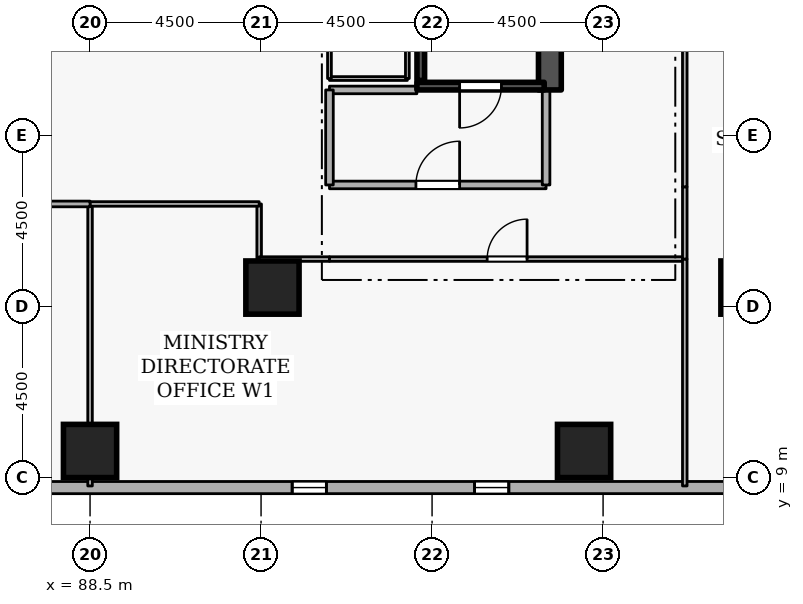
"""IFC4 building model, lengths in metres.
Left out: names, types, materials, properties, quantities, classifications, styles, units other than length and angle.
Written with IfcOpenShell. Run it as: python <this file> out.ifc"""

import sys

from ifc_helpers import new_model, si_unit, direction, frame, frame_2d, origin, origin_2d, place, context, subcontext, project, spatial, rectangle, extrude, element, fill, save


model = new_model("IFC4")
c1 = context("Model", 3, precision=1e-05, world=origin(), true_north=direction((0.0, 1.0)))
c2 = subcontext(c1, "Body", "Model", "MODEL_VIEW")
j1 = project(units=[si_unit("LENGTHUNIT", "METRE"), si_unit("PLANEANGLEUNIT", "RADIAN")], contexts=[c1])
p1 = place(None, origin())
s1 = spatial("IfcSite", under=j1, at=p1, CompositionType="ELEMENT")
p2 = place(p1, origin())
s2 = spatial("IfcBuilding", under=s1, at=p2, CompositionType="ELEMENT")
p3 = place(p2, frame((0.0, 0.0, 57.3)))
s3 = spatial("IfcBuildingStorey", under=s2, at=p3, CompositionType="ELEMENT", Elevation=57.3)
p4 = place(p3, frame((100.6, 19.2, 0.0), z_axis=(0.0, 0.0, 1.0), x_axis=(0.0, 1.0, 0.0)))
e1 = element("IfcWall", 1, at=p4, inside=s3, PredefinedType="SHEAR", context=c2, shape_type="SweptSolid", body=[
    extrude(rectangle(XDim=15.6, YDim=0.6, at=frame_2d((7.8, 0.0))), origin(), (0.0, 0.0, 1.0), 3.6),
])
for number, where, z_axis, x_axis in (
    (2, (105.8, 14.0, 0.0), (0.0, 0.0, 1.0), (1.0, 0.0, 0.0)),
    (3, (101.5, 9.7, 0.0), (0.0, 0.0, 1.0), (1.0, 0.0, 0.0)),
    (4, (88.5, 9.7, 0.0), (0.0, 0.0, 1.0), (1.0, 0.0, 0.0)),
    (5, (93.3, 14.0, 0.0), (0.0, 0.0, 1.0), (1.0, 0.0, 0.0)),
):
    element("IfcColumn", number, at=place(p3, frame(where, z_axis=z_axis, x_axis=x_axis)), inside=s3, PredefinedType="COLUMN", context=c2, shape_type="SweptSolid", body=[
        extrude(rectangle(XDim=1.4, YDim=1.4, at=origin_2d()), origin(), (0.0, 0.0, 1.0), 3.6),
    ])
p5 = place(p3, frame((72.819, 8.735, 0.0), z_axis=(0.0, 0.0, 1.0), x_axis=(0.999999996195, 8.7231344e-05, 0.0)))
e6 = element("IfcWall", 6, at=p5, inside=s3, PredefinedType="STANDARD", context=c2, shape_type="SweptSolid", body=[
    extrude(rectangle(XDim=36.384, YDim=0.32, at=frame_2d((18.192, 0.0))), origin(), (0.0, 0.0, 1.0), 2.7),
])
p6 = place(p5, frame((6.6, 0.0, 0.72)))
e7 = element("IfcOpeningElement", 7, at=p6, cuts=e6, PredefinedType="OPENING", context=c2, shape_type="SweptSolid", body=[
    extrude(rectangle(XDim=0.9, YDim=1.75, at=frame_2d((0.45, 0.875))), frame((0.0, 0.17, 0.0), z_axis=(0.0, -1.0, 0.0), x_axis=(1.0, 0.0, 0.0)), (0.0, 0.0, 1.0), 0.34),
])
p7 = place(p5, frame((11.4, 0.0, 0.72)))
e8 = element("IfcOpeningElement", 8, at=p7, cuts=e6, PredefinedType="OPENING", context=c2, shape_type="SweptSolid", body=[
    extrude(rectangle(XDim=0.9, YDim=1.75, at=frame_2d((0.45, 0.875))), frame((0.0, 0.17, 0.0), z_axis=(0.0, -1.0, 0.0), x_axis=(1.0, 0.0, 0.0)), (0.0, 0.0, 1.0), 0.34),
])
p8 = place(p5, frame((21.0, 0.0, 0.72)))
e9 = element("IfcOpeningElement", 9, at=p8, cuts=e6, PredefinedType="OPENING", context=c2, shape_type="SweptSolid", body=[
    extrude(rectangle(XDim=0.9, YDim=1.75, at=frame_2d((0.45, 0.875))), frame((0.0, 0.17, 0.0), z_axis=(0.0, -1.0, 0.0), x_axis=(1.0, 0.0, 0.0)), (0.0, 0.0, 1.0), 0.34),
])
p9 = place(p5, frame((25.8, 0.0, 0.72)))
e10 = element("IfcOpeningElement", 10, at=p9, cuts=e6, PredefinedType="OPENING", context=c2, shape_type="SweptSolid", body=[
    extrude(rectangle(XDim=0.9, YDim=1.75, at=frame_2d((0.45, 0.875))), frame((0.0, 0.17, 0.0), z_axis=(0.0, -1.0, 0.0), x_axis=(1.0, 0.0, 0.0)), (0.0, 0.0, 1.0), 0.34),
])
p10 = place(p3, frame((100.45, 19.3, 0.0), z_axis=(0.0, 0.0, 1.0), x_axis=(-1.0, 0.0, 0.0)))
e11 = element("IfcWall", 11, at=p10, inside=s3, PredefinedType="SHEAR", context=c2, shape_type="SweptSolid", body=[
    extrude(rectangle(XDim=3.35, YDim=0.2, at=frame_2d((1.675, 0.0))), origin(), (0.0, 0.0, 1.0), 3.6),
])
p11 = place(p10, frame((1.125, 0.0, 0.0)))
e12 = element("IfcOpeningElement", 12, at=p11, cuts=e11, PredefinedType="OPENING", context=c2, shape_type="SweptSolid", body=[
    extrude(rectangle(XDim=1.1, YDim=2.1, at=frame_2d((0.55, 1.05))), frame((0.0, 0.11, 0.0), z_axis=(0.0, -1.0, 0.0), x_axis=(1.0, 0.0, 0.0)), (0.0, 0.0, 1.0), 0.22),
])
p12 = place(p3, frame((97.203, 26.55, 0.0), z_axis=(0.0, 0.0, 1.0), x_axis=(0.0, -1.0, 0.0)))
e13 = element("IfcWall", 13, at=p12, inside=s3, PredefinedType="SHEAR", context=c2, shape_type="SweptSolid", body=[
    extrude(rectangle(XDim=7.1, YDim=0.2, at=frame_2d((3.55, 0.0))), origin(), (0.0, 0.0, 1.0), 3.6),
])
p13 = place(p3, frame((94.8, 16.7, 0.0), z_axis=(0.0, 0.0, 1.0), x_axis=(1.0, 0.0, 0.0)))
e14 = element("IfcWall", 14, at=p13, inside=s3, PredefinedType="STANDARD", context=c2, shape_type="SweptSolid", body=[
    extrude(rectangle(XDim=5.7, YDim=0.2, at=frame_2d((2.85, 0.0))), origin(), (0.0, 0.0, 1.0), 3.34),
])
p14 = place(p13, frame((2.275, 0.0, 0.0)))
e15 = element("IfcOpeningElement", 15, at=p14, cuts=e14, PredefinedType="OPENING", context=c2, shape_type="SweptSolid", body=[
    extrude(rectangle(XDim=1.15, YDim=2.1, at=frame_2d((0.575, 1.05))), frame((0.0, 0.11, 0.0), z_axis=(0.0, -1.0, 0.0), x_axis=(1.0, 0.0, 0.0)), (0.0, 0.0, 1.0), 0.22),
])
p15 = place(p3, frame((100.5, 16.7, 0.0), z_axis=(0.0, 0.0, 1.0), x_axis=(0.0, 1.0, 0.0)))
e16 = element("IfcWall", 16, at=p15, inside=s3, PredefinedType="STANDARD", context=c2, shape_type="SweptSolid", body=[
    extrude(rectangle(XDim=2.5, YDim=0.2, at=frame_2d((1.25, 0.0))), origin(), (0.0, 0.0, 1.0), 3.34),
])
p16 = place(p3, frame((97.1, 19.2, 0.0), z_axis=(0.0, 0.0, 1.0), x_axis=(-1.0, 0.0, 0.0)))
e17 = element("IfcWall", 17, at=p16, inside=s3, PredefinedType="STANDARD", context=c2, shape_type="SweptSolid", body=[
    extrude(rectangle(XDim=2.3, YDim=0.2, at=frame_2d((1.15, 0.0))), origin(), (0.0, 0.0, 1.0), 2.545),
])
p17 = place(p3, frame((94.8, 19.2, 0.0), z_axis=(0.0, 0.0, 1.0), x_axis=(0.0, -1.0, 0.0)))
e18 = element("IfcWall", 18, at=p17, inside=s3, PredefinedType="STANDARD", context=c2, shape_type="SweptSolid", body=[
    extrude(rectangle(XDim=2.5, YDim=0.2, at=frame_2d((1.25, 0.0))), origin(), (0.0, 0.0, 1.0), 3.34),
])
p18 = place(p3, frame((94.8, 19.5, 0.0), z_axis=(0.0, 0.0, 1.0), x_axis=(1.0, 0.0, 0.0)))
e19 = element("IfcWall", 19, at=p18, inside=s3, PredefinedType="PARTITIONING", context=c2, shape_type="SweptSolid", body=[
    extrude(rectangle(XDim=2.05, YDim=0.1, at=frame_2d((1.025, 0.0))), origin(), (0.0, 0.0, 1.0), 2.545),
])
p19 = place(p3, frame((96.85, 19.5, 0.0), z_axis=(0.0, 0.0, 1.0), x_axis=(0.0, 1.0, 0.0)))
e20 = element("IfcWall", 20, at=p19, inside=s3, PredefinedType="PARTITIONING", context=c2, shape_type="SweptSolid", body=[
    extrude(rectangle(XDim=2.6, YDim=0.1, at=frame_2d((1.3, 0.0))), origin(), (0.0, 0.0, 1.0), 3.34),
])
p20 = place(p3, frame((94.8, 22.1, 0.0), z_axis=(0.0, 0.0, 1.0), x_axis=(0.0, -1.0, 0.0)))
e21 = element("IfcWall", 21, at=p20, inside=s3, PredefinedType="PARTITIONING", context=c2, shape_type="SweptSolid", body=[
    extrude(rectangle(XDim=2.6, YDim=0.1, at=frame_2d((1.3, 0.0))), origin(), (0.0, 0.0, 1.0), 3.34),
])
p21 = place(p20, frame((0.825, 0.0, 0.0)))
e22 = element("IfcOpeningElement", 22, at=p21, cuts=e21, PredefinedType="OPENING", context=c2, shape_type="SweptSolid", body=[
    extrude(rectangle(XDim=0.95, YDim=2.1, at=frame_2d((0.475, 1.05))), frame((0.0, 0.06, 0.0), z_axis=(0.0, -1.0, 0.0), x_axis=(1.0, 0.0, 0.0)), (0.0, 0.0, 1.0), 0.12),
])
p22 = place(p3, frame((92.95, 16.2, 0.0), z_axis=(0.0, 0.0, 1.0), x_axis=(0.0, -1.0, 0.0)))
e23 = element("IfcWall", 23, at=p22, inside=s3, PredefinedType="PARTITIONING", context=c2, shape_type="SweptSolid", body=[
    extrude(rectangle(XDim=1.45, YDim=0.12, at=frame_2d((0.725, 0.0))), origin(), (0.0, 0.0, 1.0), 3.34),
])
p23 = place(p3, frame((92.95, 14.75, 0.0), z_axis=(0.0, 0.0, 1.0), x_axis=(1.0, 0.0, 0.0)))
e24 = element("IfcWall", 24, at=p23, inside=s3, PredefinedType="PARTITIONING", context=c2, shape_type="SweptSolid", body=[
    extrude(rectangle(XDim=1.85, YDim=0.12, at=frame_2d((0.925, 0.0))), origin(), (0.0, 0.0, 1.0), 3.34),
])
p24 = place(p3, frame((94.8, 14.75, 0.0), z_axis=(0.0, 0.0, 1.0), x_axis=(1.0, 0.0, 0.0)))
e25 = element("IfcWall", 25, at=p24, inside=s3, PredefinedType="PARTITIONING", context=c2, shape_type="SweptSolid", body=[
    extrude(rectangle(XDim=9.35, YDim=0.12, at=frame_2d((4.675, 0.0))), origin(), (0.0, 0.0, 1.0), 3.34),
])
p25 = place(p24, frame((4.15, 0.0, 0.0)))
e26 = element("IfcOpeningElement", 26, at=p25, cuts=e25, PredefinedType="OPENING", context=c2, shape_type="SweptSolid", body=[
    extrude(rectangle(XDim=1.05, YDim=2.1, at=frame_2d((0.525, 1.05))), frame((0.0, 0.07, 0.0), z_axis=(0.0, -1.0, 0.0), x_axis=(1.0, 0.0, 0.0)), (0.0, 0.0, 1.0), 0.14),
])
p26 = place(p3, frame((104.15, 14.75, 0.0), z_axis=(0.0, 0.0, 1.0), x_axis=(0.0, -1.0, 0.0)))
e27 = element("IfcWall", 27, at=p26, inside=s3, PredefinedType="PARTITIONING", context=c2, shape_type="SweptSolid", body=[
    extrude(rectangle(XDim=5.97, YDim=0.12, at=frame_2d((2.985, 0.0))), origin(), (0.0, 0.0, 1.0), 3.34),
])
p27 = place(p3, frame((88.5, 8.78, 0.0), z_axis=(0.0, 0.0, 1.0), x_axis=(0.0, 1.0, 0.0)))
e28 = element("IfcWall", 28, at=p27, inside=s3, PredefinedType="PARTITIONING", context=c2, shape_type="SweptSolid", body=[
    extrude(rectangle(XDim=7.42, YDim=0.12, at=frame_2d((3.71, 0.0))), origin(), (0.0, 0.0, 1.0), 2.932),
])
p28 = place(p3, frame((88.5, 16.2, 0.0), z_axis=(0.0, 0.0, 1.0), x_axis=(1.0, 0.0, 0.0)))
e29 = element("IfcWall", 29, at=p28, inside=s3, PredefinedType="PARTITIONING", context=c2, shape_type="SweptSolid", body=[
    extrude(rectangle(XDim=4.45, YDim=0.12, at=frame_2d((2.225, 0.0))), origin(), (0.0, 0.0, 1.0), 3.34),
])
p29 = place(p3, frame((84.05, 16.2, 0.0), z_axis=(0.0, 0.0, 1.0), x_axis=(1.0, 0.0, 0.0)))
e30 = element("IfcWall", 30, at=p29, inside=s3, PredefinedType="PARTITIONING", context=c2, shape_type="SweptSolid", body=[
    extrude(rectangle(XDim=4.45, YDim=0.15, at=frame_2d((2.225, 0.0))), origin(), (0.0, 0.0, 1.0), 3.34),
])
p30 = place(p29, frame((1.575, 0.0, 0.0)))
e31 = element("IfcOpeningElement", 31, at=p30, cuts=e30, PredefinedType="OPENING", context=c2, shape_type="SweptSolid", body=[
    extrude(rectangle(XDim=1.3, YDim=2.12, at=frame_2d((0.65, 1.06))), frame((0.0, 0.085, 0.0), z_axis=(0.0, -1.0, 0.0), x_axis=(1.0, 0.0, 0.0)), (0.0, 0.0, 1.0), 0.17),
])
p31 = place(p3, frame((104.15, 14.75, 0.0), z_axis=(0.0, 0.0, 1.0), x_axis=(0.0, 1.0, 0.0)))
e32 = element("IfcWall", 32, at=p31, inside=s3, PredefinedType="PARTITIONING", context=c2, shape_type="SweptSolid", body=[
    extrude(rectangle(XDim=1.9, YDim=0.12, at=frame_2d((0.95, 0.0))), origin(), (0.0, 0.0, 1.0), 3.34),
])
p32 = place(p3, frame((104.15, 16.65, 0.0), z_axis=(0.0, 0.0, 1.0), x_axis=(0.0, 1.0, 0.0)))
e33 = element("IfcWall", 33, at=p32, inside=s3, PredefinedType="PARTITIONING", context=c2, shape_type="SweptSolid", body=[
    extrude(rectangle(XDim=10.35, YDim=0.12, at=frame_2d((5.175, 0.0))), origin(), (0.0, 0.0, 1.0), 3.34),
])
p33 = place(p32, frame((4.65, 0.0, 0.0)))
e34 = element("IfcOpeningElement", 34, at=p33, cuts=e33, PredefinedType="OPENING", context=c2, shape_type="SweptSolid", body=[
    extrude(rectangle(XDim=1.05, YDim=2.1, at=frame_2d((0.525, 1.05))), frame((0.0, 0.07, 0.0), z_axis=(0.0, -1.0, 0.0), x_axis=(1.0, 0.0, 0.0)), (0.0, 0.0, 1.0), 0.14),
])
p34 = place(p8, origin())
e35 = element("IfcWindow", 35, at=p34, inside=s3, PartitioningType="SINGLE_PANEL", PredefinedType="WINDOW", context=c2, shape_type="SweptSolid", body=[
    extrude(rectangle(XDim=0.9, YDim=1.75, at=frame_2d((0.45, 0.875))), frame((0.0, 0.03, 0.0), z_axis=(0.0, -1.0, 0.0), x_axis=(1.0, 0.0, 0.0)), (0.0, 0.0, 1.0), 0.06),
])
fill(e9, e35)
p35 = place(p9, origin())
e36 = element("IfcWindow", 36, at=p35, inside=s3, PartitioningType="SINGLE_PANEL", PredefinedType="WINDOW", context=c2, shape_type="SweptSolid", body=[
    extrude(rectangle(XDim=0.9, YDim=1.75, at=frame_2d((0.45, 0.875))), frame((0.0, 0.03, 0.0), z_axis=(0.0, -1.0, 0.0), x_axis=(1.0, 0.0, 0.0)), (0.0, 0.0, 1.0), 0.06),
])
fill(e10, e36)
p36 = place(p11, origin())
e37 = element("IfcDoor", 37, at=p36, inside=s3, OperationType="SINGLE_SWING_RIGHT", PredefinedType="DOOR", context=c2, shape_type="SweptSolid", body=[
    extrude(rectangle(XDim=1.1, YDim=2.1, at=frame_2d((0.55, 1.05))), frame((0.0, 0.025, 0.0), z_axis=(0.0, -1.0, 0.0), x_axis=(1.0, 0.0, 0.0)), (0.0, 0.0, 1.0), 0.05),
])
fill(e12, e37)
p37 = place(p14, origin())
e38 = element("IfcDoor", 38, at=p37, inside=s3, OperationType="SINGLE_SWING_RIGHT", PredefinedType="DOOR", context=c2, shape_type="SweptSolid", body=[
    extrude(rectangle(XDim=1.15, YDim=2.1, at=frame_2d((0.575, 1.05))), frame((0.0, 0.025, 0.0), z_axis=(0.0, -1.0, 0.0), x_axis=(1.0, 0.0, 0.0)), (0.0, 0.0, 1.0), 0.05),
])
fill(e15, e38)
p38 = place(p25, origin())
e39 = element("IfcDoor", 39, at=p38, inside=s3, OperationType="SINGLE_SWING_RIGHT", PredefinedType="DOOR", context=c2, shape_type="SweptSolid", body=[
    extrude(rectangle(XDim=1.05, YDim=2.1, at=frame_2d((0.525, 1.05))), frame((0.0, 0.025, 0.0), z_axis=(0.0, -1.0, 0.0), x_axis=(1.0, 0.0, 0.0)), (0.0, 0.0, 1.0), 0.05),
])
fill(e26, e39)
save(model, sys.argv[1])
